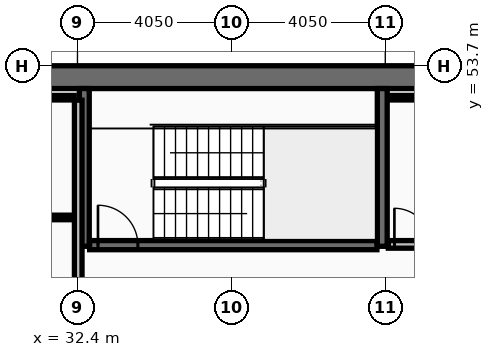
"""IFC4 building model, lengths in metres.
Left out: names, types, materials, properties, quantities, classifications, styles, units other than length and angle.
Written with IfcOpenShell. Run it as: python <this file> out.ifc"""

import sys

from ifc_helpers import new_model, si_unit, direction, frame, frame_2d, origin, place, context, subcontext, project, spatial, rectangle, extrude, element, fill, save


model = new_model("IFC4")
c1 = context("Model", 3, precision=1e-05, world=origin(), true_north=direction((0.0, 1.0)))
c2 = subcontext(c1, "Body", "Model", "MODEL_VIEW")
j1 = project(units=[si_unit("LENGTHUNIT", "METRE"), si_unit("PLANEANGLEUNIT", "RADIAN")], contexts=[c1])
p1 = place(None, origin())
s1 = spatial("IfcSite", under=j1, at=p1, CompositionType="ELEMENT")
p2 = place(p1, origin())
s2 = spatial("IfcBuilding", under=s1, at=p2, CompositionType="ELEMENT")
p3 = place(p2, frame((0.0, 0.0, 195.8)))
s3 = spatial("IfcBuildingStorey", under=s2, at=p3, CompositionType="ELEMENT", Elevation=195.8)
p4 = place(p3, frame((16.2, 53.4, 0.0), z_axis=(0.0, 0.0, 1.0), x_axis=(1.0, 0.0, 0.0)))
e1 = element("IfcWall", 1, at=p4, inside=s3, PredefinedType="SHEAR", context=c2, shape_type="SweptSolid", body=[
    extrude(rectangle(XDim=40.5, YDim=0.6, at=frame_2d((20.25, 0.0))), origin(), (0.0, 0.0, 1.0), 3.44),
])
for number, where, z_axis, x_axis in (
    (2, (32.58, 48.95, 0.0), (0.0, 0.0, 1.0), (0.0, 1.0, 0.0)),
    (3, (40.42, 48.95, 0.0), (0.0, 0.0, 1.0), (0.0, 1.0, 0.0)),
):
    element("IfcWall", number, at=place(p3, frame(where, z_axis=z_axis, x_axis=x_axis)), inside=s3, PredefinedType="SHEAR", context=c2, shape_type="SweptSolid", body=[
        extrude(rectangle(XDim=4.15, YDim=0.26, at=frame_2d((2.075, 0.0))), origin(), (0.0, 0.0, 1.0), 3.44),
    ])
p5 = place(p3, frame((32.72, 48.98, 0.0), z_axis=(0.0, 0.0, 1.0), x_axis=(1.0, 0.0, 0.0)))
e4 = element("IfcWall", 4, at=p5, inside=s3, PredefinedType="SHEAR", context=c2, shape_type="SweptSolid", body=[
    extrude(rectangle(XDim=7.56, YDim=0.24, at=frame_2d((3.78, 0.0))), origin(), (0.0, 0.0, 1.0), 3.44),
])
p6 = place(p5, frame((0.22, 0.0, 0.0)))
e5 = element("IfcOpeningElement", 5, at=p6, cuts=e4, PredefinedType="OPENING", context=c2, shape_type="SweptSolid", body=[
    extrude(rectangle(XDim=1.05, YDim=2.15, at=frame_2d((0.525, 1.075))), frame((0.0, 0.13, 0.0), z_axis=(0.0, -1.0, 0.0), x_axis=(1.0, 0.0, 0.0)), (0.0, 0.0, 1.0), 0.26),
])
p7 = place(p3, frame((32.42, 46.805, 0.0), z_axis=(0.0, 0.0, 1.0), x_axis=(0.0, 1.0, 0.0)))
e6 = element("IfcWall", 6, at=p7, inside=s3, PredefinedType="PARTITIONING", context=c2, shape_type="SweptSolid", body=[
    extrude(rectangle(XDim=5.99, YDim=0.2, at=frame_2d((2.995, 0.0))), origin(), (0.0, 0.0, 1.0), 3.44),
])
p8 = place(p3, frame((24.805, 52.86, 0.0), z_axis=(0.0, 0.0, 1.0), x_axis=(1.0, 0.0, 0.0)))
e7 = element("IfcWall", 7, at=p8, inside=s3, PredefinedType="PARTITIONING", context=c2, shape_type="SweptSolid", body=[
    extrude(rectangle(XDim=7.51, YDim=0.12, at=frame_2d((3.755, 0.0))), origin(), (0.0, 0.0, 1.0), 3.44),
])
p9 = place(p3, frame((24.805, 49.709, 0.0), z_axis=(0.0, 0.0, 1.0), x_axis=(1.0, 0.0, 0.0)))
e8 = element("IfcWall", 8, at=p9, inside=s3, PredefinedType="PARTITIONING", context=c2, shape_type="SweptSolid", body=[
    extrude(rectangle(XDim=7.51, YDim=0.12, at=frame_2d((3.755, 0.0))), origin(), (0.0, 0.0, 1.0), 3.44),
])
p10 = place(p9, frame((2.4, 0.0, 0.0)))
e9 = element("IfcOpeningElement", 9, at=p10, cuts=e8, PredefinedType="OPENING", context=c2, shape_type="SweptSolid", body=[
    extrude(rectangle(XDim=0.9, YDim=2.05, at=frame_2d((0.45, 1.025))), frame((0.0, 0.07, 0.0), z_axis=(0.0, -1.0, 0.0), x_axis=(1.0, 0.0, 0.0)), (0.0, 0.0, 1.0), 0.14),
])
p11 = place(p3, frame((40.58, 52.86, 0.0), z_axis=(0.0, 0.0, 1.0), x_axis=(1.0, 0.0, 0.0)))
e10 = element("IfcWall", 10, at=p11, inside=s3, PredefinedType="PARTITIONING", context=c2, shape_type="SweptSolid", body=[
    extrude(rectangle(XDim=7.56, YDim=0.12, at=frame_2d((3.78, 0.0))), origin(), (0.0, 0.0, 1.0), 3.44),
])
p12 = place(p3, frame((40.58, 49.0, 0.0), z_axis=(0.0, 0.0, 1.0), x_axis=(1.0, 0.0, 0.0)))
e11 = element("IfcWall", 11, at=p12, inside=s3, PredefinedType="PARTITIONING", context=c2, shape_type="SweptSolid", body=[
    extrude(rectangle(XDim=7.56, YDim=0.2, at=frame_2d((3.78, 0.0))), origin(), (0.0, 0.0, 1.0), 3.44),
])
p13 = place(p12, frame((0.16, 0.0, 0.0)))
e12 = element("IfcOpeningElement", 12, at=p13, cuts=e11, PredefinedType="OPENING", context=c2, shape_type="SweptSolid", body=[
    extrude(rectangle(XDim=0.95, YDim=2.1, at=frame_2d((0.475, 1.05))), frame((0.0, 0.11, 0.0), z_axis=(0.0, -1.0, 0.0), x_axis=(1.0, 0.0, 0.0)), (0.0, 0.0, 1.0), 0.22),
])
p14 = place(p6, origin())
e13 = element("IfcDoor", 13, at=p14, inside=s3, OperationType="SINGLE_SWING_LEFT", PredefinedType="DOOR", context=c2, shape_type="SweptSolid", body=[
    extrude(rectangle(XDim=1.05, YDim=2.15, at=frame_2d((0.525, 1.075))), frame((0.0, 0.025, 0.0), z_axis=(0.0, -1.0, 0.0), x_axis=(1.0, 0.0, 0.0)), (0.0, 0.0, 1.0), 0.05),
])
fill(e5, e13)
p15 = place(p13, origin())
e14 = element("IfcDoor", 14, at=p15, inside=s3, OperationType="SINGLE_SWING_LEFT", PredefinedType="DOOR", context=c2, shape_type="SweptSolid", body=[
    extrude(rectangle(XDim=0.95, YDim=2.1, at=frame_2d((0.475, 1.05))), frame((0.0, 0.025, 0.0), z_axis=(0.0, -1.0, 0.0), x_axis=(1.0, 0.0, 0.0)), (0.0, 0.0, 1.0), 0.05),
])
fill(e12, e14)
save(model, sys.argv[1])
